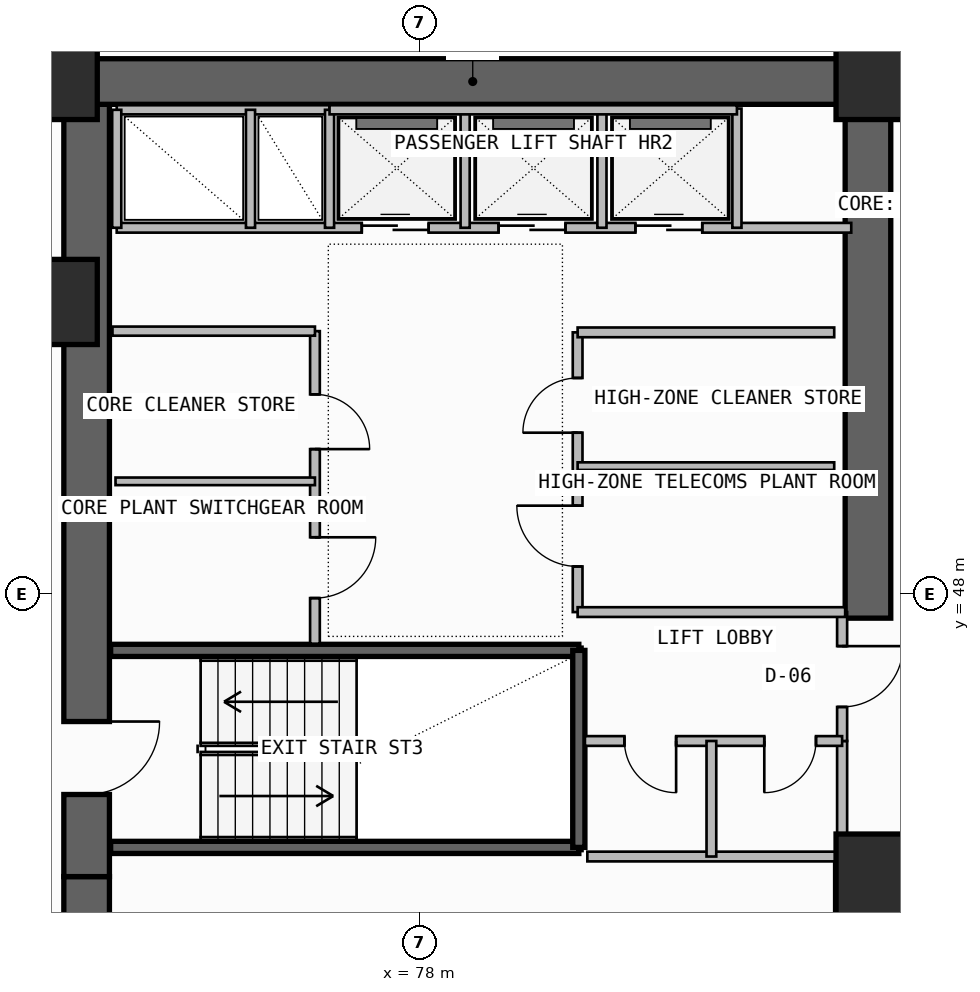
"""IFC4 building model, lengths in metres.
Left out: names, types, materials, properties, quantities, classifications, styles, units other than length and angle.
Written with IfcOpenShell. Run it as: python <this file> out.ifc"""

import sys

from ifc_helpers import new_model, si_unit, direction, frame, frame_2d, origin, origin_2d, place, context, subcontext, project, spatial, rectangle, extrude, element, fill, save


model = new_model("IFC4")
c1 = context("Model", 3, precision=1e-05, world=origin(), true_north=direction((0.0, 1.0)))
c2 = subcontext(c1, "Body", "Model", "MODEL_VIEW")
j1 = project(units=[si_unit("LENGTHUNIT", "METRE"), si_unit("PLANEANGLEUNIT", "RADIAN")], contexts=[c1])
p1 = place(None, origin())
s1 = spatial("IfcSite", under=j1, at=p1, CompositionType="ELEMENT")
p2 = place(p1, origin())
s2 = spatial("IfcBuilding", under=s1, at=p2, CompositionType="ELEMENT")
p3 = place(p2, frame((0.0, 0.0, 207.94)))
s3 = spatial("IfcBuildingStorey", under=s2, at=p3, CompositionType="ELEMENT", Elevation=207.94)
p4 = place(p3, frame((72.525, 35.5, -0.26), z_axis=(0.0, 0.0, 1.0), x_axis=(0.0, 1.0, 0.0)))
e1 = element("IfcWall", 1, at=p4, inside=s3, PredefinedType="SHEAR", context=c2, shape_type="SweptSolid", body=[
    extrude(rectangle(XDim=7.85, YDim=0.75, at=frame_2d((3.925, 0.0))), origin(), (0.0, 0.0, 1.0), 3.52),
])
p5 = place(p4, frame((1.45, 0.0, 0.26)))
e2 = element("IfcOpeningElement", 2, at=p5, cuts=e1, PredefinedType="OPENING", context=c2, shape_type="SweptSolid", body=[
    extrude(rectangle(XDim=1.2, YDim=2.2, at=frame_2d((0.6, 1.1))), frame((0.0, 0.385, 0.0), z_axis=(0.0, -1.0, 0.0), x_axis=(1.0, 0.0, 0.0)), (0.0, 0.0, 1.0), 0.77),
])
p6 = place(p3, frame((72.525, 43.35, -0.26), z_axis=(0.0, 0.0, 1.0), x_axis=(0.0, 1.0, 0.0)))
e3 = element("IfcWall", 3, at=p6, inside=s3, PredefinedType="SHEAR", context=c2, shape_type="SweptSolid", body=[
    extrude(rectangle(XDim=12.7, YDim=0.75, at=frame_2d((6.35, 0.0))), origin(), (0.0, 0.0, 1.0), 3.52),
])
p7 = place(p6, frame((1.35, 0.0, 0.26)))
e4 = element("IfcOpeningElement", 4, at=p7, cuts=e3, PredefinedType="OPENING", context=c2, shape_type="SweptSolid", body=[
    extrude(rectangle(XDim=1.2, YDim=2.2, at=frame_2d((0.6, 1.1))), frame((0.0, 0.385, 0.0), z_axis=(0.0, -1.0, 0.0), x_axis=(1.0, 0.0, 0.0)), (0.0, 0.0, 1.0), 0.77),
])
p8 = place(p3, frame((72.0, 56.425, -0.26), z_axis=(0.0, 0.0, 1.0), x_axis=(1.0, 0.0, 0.0)))
e5 = element("IfcWall", 5, at=p8, inside=s3, PredefinedType="SHEAR", context=c2, shape_type="SweptSolid", body=[
    extrude(rectangle(XDim=13.75, YDim=0.75, at=frame_2d((6.875, 0.0))), origin(), (0.0, 0.0, 1.0), 3.52),
])
p9 = place(p3, frame((85.375, 47.6, -0.26), z_axis=(0.0, 0.0, 1.0), x_axis=(0.0, 1.0, 0.0)))
e6 = element("IfcWall", 6, at=p9, inside=s3, PredefinedType="SHEAR", context=c2, shape_type="SweptSolid", body=[
    extrude(rectangle(XDim=8.45, YDim=0.75, at=frame_2d((4.225, 0.0))), origin(), (0.0, 0.0, 1.0), 3.52),
])
for number, where, z_axis, x_axis in (
    (7, (85.55, 43.35, 0.0), (0.0, 0.0, 1.0), (1.0, 0.0, 0.0)),
    (8, (72.0, 52.8, 0.0), (0.0, 0.0, 1.0), (1.0, 0.0, 0.0)),
    (9, (72.0, 56.5, 0.0), (0.0, 0.0, 1.0), (1.0, 0.0, 0.0)),
    (10, (85.55, 56.5, 0.0), (0.0, 0.0, 1.0), (1.0, 0.0, 0.0)),
):
    element("IfcColumn", number, at=place(p3, frame(where, z_axis=z_axis, x_axis=x_axis)), inside=s3, PredefinedType="COLUMN", context=c2, shape_type="SweptSolid", body=[
        extrude(rectangle(XDim=1.4, YDim=1.4, at=origin_2d()), origin(), (0.0, 0.0, 1.0), 3.52),
    ])
p10 = place(p3, frame((116.396, 56.722, 0.0), z_axis=(0.0, 0.0, 1.0), x_axis=(-0.977936620644, 0.208901809478, 0.0)))
e11 = element("IfcWall", 11, at=p10, inside=s3, PredefinedType="PARAPET", context=c2, shape_type="SweptSolid", body=[
    extrude(rectangle(XDim=31.685, YDim=0.2, at=frame_2d((15.843, 0.0))), origin(), (0.0, 0.0, 1.0), 1.15),
])
p11 = place(p3, frame((84.92, 38.85, 0.0), z_axis=(0.0, 0.0, 1.0), x_axis=(0.0, 1.0, 0.0)))
e12 = element("IfcWall", 12, at=p11, inside=s3, PredefinedType="SOLIDWALL", context=c2, shape_type="SweptSolid", body=[
    extrude(rectangle(XDim=4.83, YDim=0.2, at=frame_2d((2.415, 0.0))), origin(), (0.0, 0.0, 1.0), 3.26),
])
p12 = place(p11, frame((1.25, 0.0, 0.0)))
e13 = element("IfcOpeningElement", 13, at=p12, cuts=e12, PredefinedType="OPENING", context=c2, shape_type="SweptSolid", body=[
    extrude(rectangle(XDim=1.1, YDim=2.2, at=frame_2d((0.55, 1.1))), frame((0.0, 0.11, 0.0), z_axis=(0.0, -1.0, 0.0), x_axis=(1.0, 0.0, 0.0)), (0.0, 0.0, 1.0), 0.22),
])
for number, where, z_axis, x_axis in (
    (14, (72.92, 43.83, -0.26), (0.0, 0.0, 1.0), (1.0, 0.0, 0.0)),
    (15, (72.92, 47.07, -0.26), (0.0, 0.0, 1.0), (1.0, 0.0, 0.0)),
):
    element("IfcWall", number, at=place(p3, frame(where, z_axis=z_axis, x_axis=x_axis)), inside=s3, PredefinedType="SOLIDWALL", context=c2, shape_type="SweptSolid", body=[
        extrude(rectangle(XDim=7.7, YDim=0.2, at=frame_2d((3.85, 0.0))), origin(), (0.0, 0.0, 1.0), 3.52),
    ])
p13 = place(p3, frame((80.62, 43.83, -0.26), z_axis=(0.0, 0.0, 1.0), x_axis=(0.0, 1.0, 0.0)))
e16 = element("IfcWall", 16, at=p13, inside=s3, PredefinedType="SOLIDWALL", context=c2, shape_type="SweptSolid", body=[
    extrude(rectangle(XDim=3.24, YDim=0.2, at=frame_2d((1.62, 0.0))), origin(), (0.0, 0.0, 1.0), 3.52),
])
p14 = place(p3, frame((84.95, 43.68, 0.0), z_axis=(0.0, 0.0, 1.0), x_axis=(0.0, 1.0, 0.0)))
e17 = element("IfcWall", 17, at=p14, inside=s3, PredefinedType="PLUMBINGWALL", context=c2, shape_type="SweptSolid", body=[
    extrude(rectangle(XDim=1.9, YDim=0.165, at=frame_2d((0.95, 0.0))), origin(), (0.0, 0.0, 1.0), 3.26),
])
p15 = place(p3, frame((84.95, 45.58, 0.0), z_axis=(0.0, 0.0, 1.0), x_axis=(0.0, 1.0, 0.0)))
e18 = element("IfcWall", 18, at=p15, inside=s3, PredefinedType="PARTITIONING", context=c2, shape_type="SweptSolid", body=[
    extrude(rectangle(XDim=2.12, YDim=0.165, at=frame_2d((1.06, 0.0))), origin(), (0.0, 0.0, 1.0), 3.26),
])
p16 = place(p15, frame((0.56, 0.0, 0.0)))
e19 = element("IfcOpeningElement", 19, at=p16, cuts=e18, PredefinedType="OPENING", context=c2, shape_type="SweptSolid", body=[
    extrude(rectangle(XDim=1.0, YDim=2.2, at=frame_2d((0.5, 1.1))), frame((0.0, 0.093, 0.0), z_axis=(0.0, -1.0, 0.0), x_axis=(1.0, 0.0, 0.0)), (0.0, 0.0, 1.0), 0.185),
])
p17 = place(p3, frame((80.72, 45.58, 0.0), z_axis=(0.0, 0.0, 1.0), x_axis=(1.0, 0.0, 0.0)))
e20 = element("IfcWall", 20, at=p17, inside=s3, PredefinedType="PLUMBINGWALL", context=c2, shape_type="SweptSolid", body=[
    extrude(rectangle(XDim=4.23, YDim=0.16, at=frame_2d((2.115, 0.0))), origin(), (0.0, 0.0, 1.0), 3.26),
])
p18 = place(p17, frame((0.65, 0.0, 0.0)))
e21 = element("IfcOpeningElement", 21, at=p18, cuts=e20, PredefinedType="OPENING", context=c2, shape_type="SweptSolid", body=[
    extrude(rectangle(XDim=0.85, YDim=2.05, at=frame_2d((0.425, 1.025))), frame((0.0, 0.09, 0.0), z_axis=(0.0, -1.0, 0.0), x_axis=(1.0, 0.0, 0.0)), (0.0, 0.0, 1.0), 0.18),
])
p19 = place(p17, frame((2.95, 0.0, 0.0)))
e22 = element("IfcOpeningElement", 22, at=p19, cuts=e20, PredefinedType="OPENING", context=c2, shape_type="SweptSolid", body=[
    extrude(rectangle(XDim=0.85, YDim=2.05, at=frame_2d((0.425, 1.025))), frame((0.0, 0.09, 0.0), z_axis=(0.0, -1.0, 0.0), x_axis=(1.0, 0.0, 0.0)), (0.0, 0.0, 1.0), 0.18),
])
p20 = place(p3, frame((80.76, 43.68, 0.0), z_axis=(0.0, 0.0, 1.0), x_axis=(1.0, 0.0, 0.0)))
e23 = element("IfcWall", 23, at=p20, inside=s3, PredefinedType="PLUMBINGWALL", context=c2, shape_type="SweptSolid", body=[
    extrude(rectangle(XDim=4.19, YDim=0.16, at=frame_2d((2.095, 0.0))), origin(), (0.0, 0.0, 1.0), 3.26),
])
p21 = place(p3, frame((82.8, 43.68, 0.0), z_axis=(0.0, 0.0, 1.0), x_axis=(0.0, 1.0, 0.0)))
e24 = element("IfcWall", 24, at=p21, inside=s3, PredefinedType="PLUMBINGWALL", context=c2, shape_type="SweptSolid", body=[
    extrude(rectangle(XDim=1.9, YDim=0.16, at=frame_2d((0.95, 0.0))), origin(), (0.0, 0.0, 1.0), 3.26),
])
p22 = place(p3, frame((76.28, 47.18, 0.0), z_axis=(0.0, 0.0, 1.0), x_axis=(0.0, 1.0, 0.0)))
e25 = element("IfcWall", 25, at=p22, inside=s3, PredefinedType="SOLIDWALL", context=c2, shape_type="SweptSolid", body=[
    extrude(rectangle(XDim=5.14, YDim=0.16, at=frame_2d((2.57, 0.0))), origin(), (0.0, 0.0, 1.0), 3.26),
])
p23 = place(p22, frame((0.75, 0.0, 0.0)))
e26 = element("IfcOpeningElement", 26, at=p23, cuts=e25, PredefinedType="OPENING", context=c2, shape_type="SweptSolid", body=[
    extrude(rectangle(XDim=1.0, YDim=2.2, at=frame_2d((0.5, 1.1))), frame((0.0, 0.09, 0.0), z_axis=(0.0, -1.0, 0.0), x_axis=(1.0, 0.0, 0.0)), (0.0, 0.0, 1.0), 0.18),
])
p24 = place(p22, frame((3.2, 0.0, 0.0)))
e27 = element("IfcOpeningElement", 27, at=p24, cuts=e25, PredefinedType="OPENING", context=c2, shape_type="SweptSolid", body=[
    extrude(rectangle(XDim=0.9, YDim=2.1, at=frame_2d((0.45, 1.05))), frame((0.0, 0.09, 0.0), z_axis=(0.0, -1.0, 0.0), x_axis=(1.0, 0.0, 0.0)), (0.0, 0.0, 1.0), 0.18),
])
p25 = place(p3, frame((72.95, 52.32, 0.0), z_axis=(0.0, 0.0, 1.0), x_axis=(1.0, 0.0, 0.0)))
e28 = element("IfcWall", 28, at=p25, inside=s3, PredefinedType="SOLIDWALL", context=c2, shape_type="SweptSolid", body=[
    extrude(rectangle(XDim=3.33, YDim=0.15, at=frame_2d((1.665, 0.0))), origin(), (0.0, 0.0, 1.0), 3.26),
])
p26 = place(p3, frame((73.0, 49.85, 0.0), z_axis=(0.0, 0.0, 1.0), x_axis=(1.0, 0.0, 0.0)))
e29 = element("IfcWall", 29, at=p26, inside=s3, PredefinedType="PARTITIONING", context=c2, shape_type="SweptSolid", body=[
    extrude(rectangle(XDim=3.28, YDim=0.125, at=frame_2d((1.64, 0.0))), origin(), (0.0, 0.0, 1.0), 3.26),
])
p27 = place(p3, frame((80.6, 47.7, 0.0), z_axis=(0.0, 0.0, 1.0), x_axis=(0.0, 1.0, 0.0)))
e30 = element("IfcWall", 30, at=p27, inside=s3, PredefinedType="SOLIDWALL", context=c2, shape_type="SweptSolid", body=[
    extrude(rectangle(XDim=4.6, YDim=0.16, at=frame_2d((2.3, 0.0))), origin(), (0.0, 0.0, 1.0), 3.26),
])
p28 = place(p27, frame((0.75, 0.0, 0.0)))
e31 = element("IfcOpeningElement", 31, at=p28, cuts=e30, PredefinedType="OPENING", context=c2, shape_type="SweptSolid", body=[
    extrude(rectangle(XDim=1.0, YDim=2.2, at=frame_2d((0.5, 1.1))), frame((0.0, 0.09, 0.0), z_axis=(0.0, -1.0, 0.0), x_axis=(1.0, 0.0, 0.0)), (0.0, 0.0, 1.0), 0.18),
])
p29 = place(p27, frame((2.95, 0.0, 0.0)))
e32 = element("IfcOpeningElement", 32, at=p29, cuts=e30, PredefinedType="OPENING", context=c2, shape_type="SweptSolid", body=[
    extrude(rectangle(XDim=0.9, YDim=2.1, at=frame_2d((0.45, 1.05))), frame((0.0, 0.09, 0.0), z_axis=(0.0, -1.0, 0.0), x_axis=(1.0, 0.0, 0.0)), (0.0, 0.0, 1.0), 0.18),
])
p30 = place(p3, frame((80.6, 47.7, 0.0), z_axis=(0.0, 0.0, 1.0), x_axis=(1.0, 0.0, 0.0)))
e33 = element("IfcWall", 33, at=p30, inside=s3, PredefinedType="SOLIDWALL", context=c2, shape_type="SweptSolid", body=[
    extrude(rectangle(XDim=4.4, YDim=0.16, at=frame_2d((2.2, 0.0))), origin(), (0.0, 0.0, 1.0), 3.26),
])
p31 = place(p3, frame((80.6, 52.3, 0.0), z_axis=(0.0, 0.0, 1.0), x_axis=(1.0, 0.0, 0.0)))
e34 = element("IfcWall", 34, at=p31, inside=s3, PredefinedType="SOLIDWALL", context=c2, shape_type="SweptSolid", body=[
    extrude(rectangle(XDim=4.22, YDim=0.16, at=frame_2d((2.11, 0.0))), origin(), (0.0, 0.0, 1.0), 3.26),
])
p32 = place(p3, frame((80.6, 50.1, 0.0), z_axis=(0.0, 0.0, 1.0), x_axis=(1.0, 0.0, 0.0)))
e35 = element("IfcWall", 35, at=p32, inside=s3, PredefinedType="PARTITIONING", context=c2, shape_type="SweptSolid", body=[
    extrude(rectangle(XDim=4.22, YDim=0.125, at=frame_2d((2.11, 0.0))), origin(), (0.0, 0.0, 1.0), 3.26),
])
p33 = place(p3, frame((73.02, 54.02, 0.0), z_axis=(0.0, 0.0, 1.0), x_axis=(1.0, 0.0, 0.0)))
e36 = element("IfcWall", 36, at=p33, inside=s3, PredefinedType="SOLIDWALL", context=c2, shape_type="SweptSolid", body=[
    extrude(rectangle(XDim=12.08, YDim=0.16, at=frame_2d((6.04, 0.0))), origin(), (0.0, 0.0, 1.0), 3.26),
])
p34 = place(p33, frame((4.03, 0.0, 0.0)))
e37 = element("IfcOpeningElement", 37, at=p34, cuts=e36, PredefinedType="OPENING", context=c2, shape_type="SweptSolid", body=[
    extrude(rectangle(XDim=1.1, YDim=2.25, at=frame_2d((0.55, 1.125))), frame((0.0, 0.09, 0.0), z_axis=(0.0, -1.0, 0.0), x_axis=(1.0, 0.0, 0.0)), (0.0, 0.0, 1.0), 0.18),
])
p35 = place(p33, frame((6.28, 0.0, 0.0)))
e38 = element("IfcOpeningElement", 38, at=p35, cuts=e36, PredefinedType="OPENING", context=c2, shape_type="SweptSolid", body=[
    extrude(rectangle(XDim=1.1, YDim=2.25, at=frame_2d((0.55, 1.125))), frame((0.0, 0.09, 0.0), z_axis=(0.0, -1.0, 0.0), x_axis=(1.0, 0.0, 0.0)), (0.0, 0.0, 1.0), 0.18),
])
p36 = place(p33, frame((8.53, 0.0, 0.0)))
e39 = element("IfcOpeningElement", 39, at=p36, cuts=e36, PredefinedType="OPENING", context=c2, shape_type="SweptSolid", body=[
    extrude(rectangle(XDim=1.1, YDim=2.25, at=frame_2d((0.55, 1.125))), frame((0.0, 0.09, 0.0), z_axis=(0.0, -1.0, 0.0), x_axis=(1.0, 0.0, 0.0)), (0.0, 0.0, 1.0), 0.18),
])
p37 = place(p3, frame((73.02, 55.96, 0.0), z_axis=(0.0, 0.0, 1.0), x_axis=(1.0, 0.0, 0.0)))
e40 = element("IfcWall", 40, at=p37, inside=s3, PredefinedType="SOLIDWALL", context=c2, shape_type="SweptSolid", body=[
    extrude(rectangle(XDim=3.5, YDim=0.15, at=frame_2d((1.75, 0.0))), origin(), (0.0, 0.0, 1.0), 3.26),
])
p38 = place(p3, frame((73.02, 54.02, 0.0), z_axis=(0.0, 0.0, 1.0), x_axis=(0.0, 1.0, 0.0)))
e41 = element("IfcWall", 41, at=p38, inside=s3, PredefinedType="PLUMBINGWALL", context=c2, shape_type="SweptSolid", body=[
    extrude(rectangle(XDim=1.94, YDim=0.15, at=frame_2d((0.97, 0.0))), origin(), (0.0, 0.0, 1.0), 3.26),
])
p39 = place(p3, frame((76.52, 54.02, 0.0), z_axis=(0.0, 0.0, 1.0), x_axis=(0.0, 1.0, 0.0)))
e42 = element("IfcWall", 42, at=p39, inside=s3, PredefinedType="SOLIDWALL", context=c2, shape_type="SweptSolid", body=[
    extrude(rectangle(XDim=1.94, YDim=0.15, at=frame_2d((0.97, 0.0))), origin(), (0.0, 0.0, 1.0), 3.26),
])
p40 = place(p3, frame((75.22, 54.02, 0.0), z_axis=(0.0, 0.0, 1.0), x_axis=(0.0, 1.0, 0.0)))
e43 = element("IfcWall", 43, at=p40, inside=s3, PredefinedType="PLUMBINGWALL", context=c2, shape_type="SweptSolid", body=[
    extrude(rectangle(XDim=1.94, YDim=0.15, at=frame_2d((0.97, 0.0))), origin(), (0.0, 0.0, 1.0), 3.26),
])
for number, where, z_axis, x_axis in (
    (44, (78.75, 54.02, 0.0), (0.0, 0.0, 1.0), (0.0, 1.0, 0.0)),
    (45, (81.0, 54.02, 0.0), (0.0, 0.0, 1.0), (0.0, 1.0, 0.0)),
):
    element("IfcWall", number, at=place(p3, frame(where, z_axis=z_axis, x_axis=x_axis)), inside=s3, PredefinedType="PLUMBINGWALL", context=c2, shape_type="SweptSolid", body=[
        extrude(rectangle(XDim=1.96, YDim=0.15, at=frame_2d((0.98, 0.0))), origin(), (0.0, 0.0, 1.0), 3.26),
    ])
p41 = place(p3, frame((83.22, 54.02, 0.0), z_axis=(0.0, 0.0, 1.0), x_axis=(0.0, 1.0, 0.0)))
e46 = element("IfcWall", 46, at=p41, inside=s3, PredefinedType="SOLIDWALL", context=c2, shape_type="SweptSolid", body=[
    extrude(rectangle(XDim=1.96, YDim=0.15, at=frame_2d((0.98, 0.0))), origin(), (0.0, 0.0, 1.0), 3.26),
])
p42 = place(p3, frame((76.52, 55.96, 0.0), z_axis=(0.0, 0.0, 1.0), x_axis=(1.0, 0.0, 0.0)))
e47 = element("IfcWall", 47, at=p42, inside=s3, PredefinedType="SOLIDWALL", context=c2, shape_type="SweptSolid", body=[
    extrude(rectangle(XDim=6.7, YDim=0.15, at=frame_2d((3.35, 0.0))), origin(), (0.0, 0.0, 1.0), 3.26),
])
p43 = place(p7, frame((1.2, 0.0, 0.0), z_axis=(0.0, 0.0, 1.0), x_axis=(-1.0, 0.0, 0.0)))
e48 = element("IfcDoor", 48, at=p43, inside=s3, OperationType="SINGLE_SWING_LEFT", PredefinedType="USERDEFINED", context=c2, shape_type="SweptSolid", body=[
    extrude(rectangle(XDim=1.2, YDim=2.2, at=frame_2d((0.6, 1.1))), frame((0.0, 0.025, 0.0), z_axis=(0.0, -1.0, 0.0), x_axis=(1.0, 0.0, 0.0)), (0.0, 0.0, 1.0), 0.05),
])
fill(e4, e48)
p44 = place(p16, frame((1.0, 0.0, 0.0), z_axis=(0.0, 0.0, 1.0), x_axis=(-1.0, 0.0, 0.0)))
e49 = element("IfcDoor", 49, at=p44, inside=s3, OperationType="SINGLE_SWING_LEFT", PredefinedType="DOOR", context=c2, shape_type="SweptSolid", body=[
    extrude(rectangle(XDim=1.0, YDim=2.2, at=frame_2d((0.5, 1.1))), frame((0.0, 0.025, 0.0), z_axis=(0.0, -1.0, 0.0), x_axis=(1.0, 0.0, 0.0)), (0.0, 0.0, 1.0), 0.05),
])
fill(e19, e49)
p45 = place(p18, frame((0.85, 0.0, 0.0), z_axis=(0.0, 0.0, 1.0), x_axis=(-1.0, 0.0, 0.0)))
e50 = element("IfcDoor", 50, at=p45, inside=s3, OperationType="SINGLE_SWING_LEFT", PredefinedType="DOOR", context=c2, shape_type="SweptSolid", body=[
    extrude(rectangle(XDim=0.85, YDim=2.05, at=frame_2d((0.425, 1.025))), frame((0.0, 0.025, 0.0), z_axis=(0.0, -1.0, 0.0), x_axis=(1.0, 0.0, 0.0)), (0.0, 0.0, 1.0), 0.05),
])
fill(e21, e50)
p46 = place(p19, frame((0.85, 0.0, 0.0), z_axis=(0.0, 0.0, 1.0), x_axis=(-1.0, 0.0, 0.0)))
e51 = element("IfcDoor", 51, at=p46, inside=s3, OperationType="SINGLE_SWING_RIGHT", PredefinedType="DOOR", context=c2, shape_type="SweptSolid", body=[
    extrude(rectangle(XDim=0.85, YDim=2.05, at=frame_2d((0.425, 1.025))), frame((0.0, 0.025, 0.0), z_axis=(0.0, -1.0, 0.0), x_axis=(1.0, 0.0, 0.0)), (0.0, 0.0, 1.0), 0.05),
])
fill(e22, e51)
p47 = place(p23, frame((1.0, 0.0, 0.0), z_axis=(0.0, 0.0, 1.0), x_axis=(-1.0, 0.0, 0.0)))
e52 = element("IfcDoor", 52, at=p47, inside=s3, OperationType="SINGLE_SWING_LEFT", PredefinedType="DOOR", context=c2, shape_type="SweptSolid", body=[
    extrude(rectangle(XDim=1.0, YDim=2.2, at=frame_2d((0.5, 1.1))), frame((0.0, 0.025, 0.0), z_axis=(0.0, -1.0, 0.0), x_axis=(1.0, 0.0, 0.0)), (0.0, 0.0, 1.0), 0.05),
])
fill(e26, e52)
p48 = place(p24, frame((0.9, 0.0, 0.0), z_axis=(0.0, 0.0, 1.0), x_axis=(-1.0, 0.0, 0.0)))
e53 = element("IfcDoor", 53, at=p48, inside=s3, OperationType="SINGLE_SWING_RIGHT", PredefinedType="DOOR", context=c2, shape_type="SweptSolid", body=[
    extrude(rectangle(XDim=0.9, YDim=2.1, at=frame_2d((0.45, 1.05))), frame((0.0, 0.025, 0.0), z_axis=(0.0, -1.0, 0.0), x_axis=(1.0, 0.0, 0.0)), (0.0, 0.0, 1.0), 0.05),
])
fill(e27, e53)
p49 = place(p28, origin())
e54 = element("IfcDoor", 54, at=p49, inside=s3, OperationType="SINGLE_SWING_RIGHT", PredefinedType="DOOR", context=c2, shape_type="SweptSolid", body=[
    extrude(rectangle(XDim=1.0, YDim=2.2, at=frame_2d((0.5, 1.1))), frame((0.0, 0.025, 0.0), z_axis=(0.0, -1.0, 0.0), x_axis=(1.0, 0.0, 0.0)), (0.0, 0.0, 1.0), 0.05),
])
fill(e31, e54)
p50 = place(p29, origin())
e55 = element("IfcDoor", 55, at=p50, inside=s3, OperationType="SINGLE_SWING_LEFT", PredefinedType="DOOR", context=c2, shape_type="SweptSolid", body=[
    extrude(rectangle(XDim=0.9, YDim=2.1, at=frame_2d((0.45, 1.05))), frame((0.0, 0.025, 0.0), z_axis=(0.0, -1.0, 0.0), x_axis=(1.0, 0.0, 0.0)), (0.0, 0.0, 1.0), 0.05),
])
fill(e32, e55)
p51 = place(p34, origin())
e56 = element("IfcDoor", 56, at=p51, inside=s3, OperationType="DOUBLE_DOOR_SLIDING", PredefinedType="DOOR", context=c2, shape_type="SweptSolid", body=[
    extrude(rectangle(XDim=1.1, YDim=2.25, at=frame_2d((0.55, 1.125))), frame((0.0, 0.025, 0.0), z_axis=(0.0, -1.0, 0.0), x_axis=(1.0, 0.0, 0.0)), (0.0, 0.0, 1.0), 0.05),
])
fill(e37, e56)
p52 = place(p35, origin())
e57 = element("IfcDoor", 57, at=p52, inside=s3, OperationType="DOUBLE_DOOR_SLIDING", PredefinedType="DOOR", context=c2, shape_type="SweptSolid", body=[
    extrude(rectangle(XDim=1.1, YDim=2.25, at=frame_2d((0.55, 1.125))), frame((0.0, 0.025, 0.0), z_axis=(0.0, -1.0, 0.0), x_axis=(1.0, 0.0, 0.0)), (0.0, 0.0, 1.0), 0.05),
])
fill(e38, e57)
p53 = place(p36, origin())
e58 = element("IfcDoor", 58, at=p53, inside=s3, OperationType="DOUBLE_DOOR_SLIDING", PredefinedType="DOOR", context=c2, shape_type="SweptSolid", body=[
    extrude(rectangle(XDim=1.1, YDim=2.25, at=frame_2d((0.55, 1.125))), frame((0.0, 0.025, 0.0), z_axis=(0.0, -1.0, 0.0), x_axis=(1.0, 0.0, 0.0)), (0.0, 0.0, 1.0), 0.05),
])
fill(e39, e58)
save(model, sys.argv[1])
